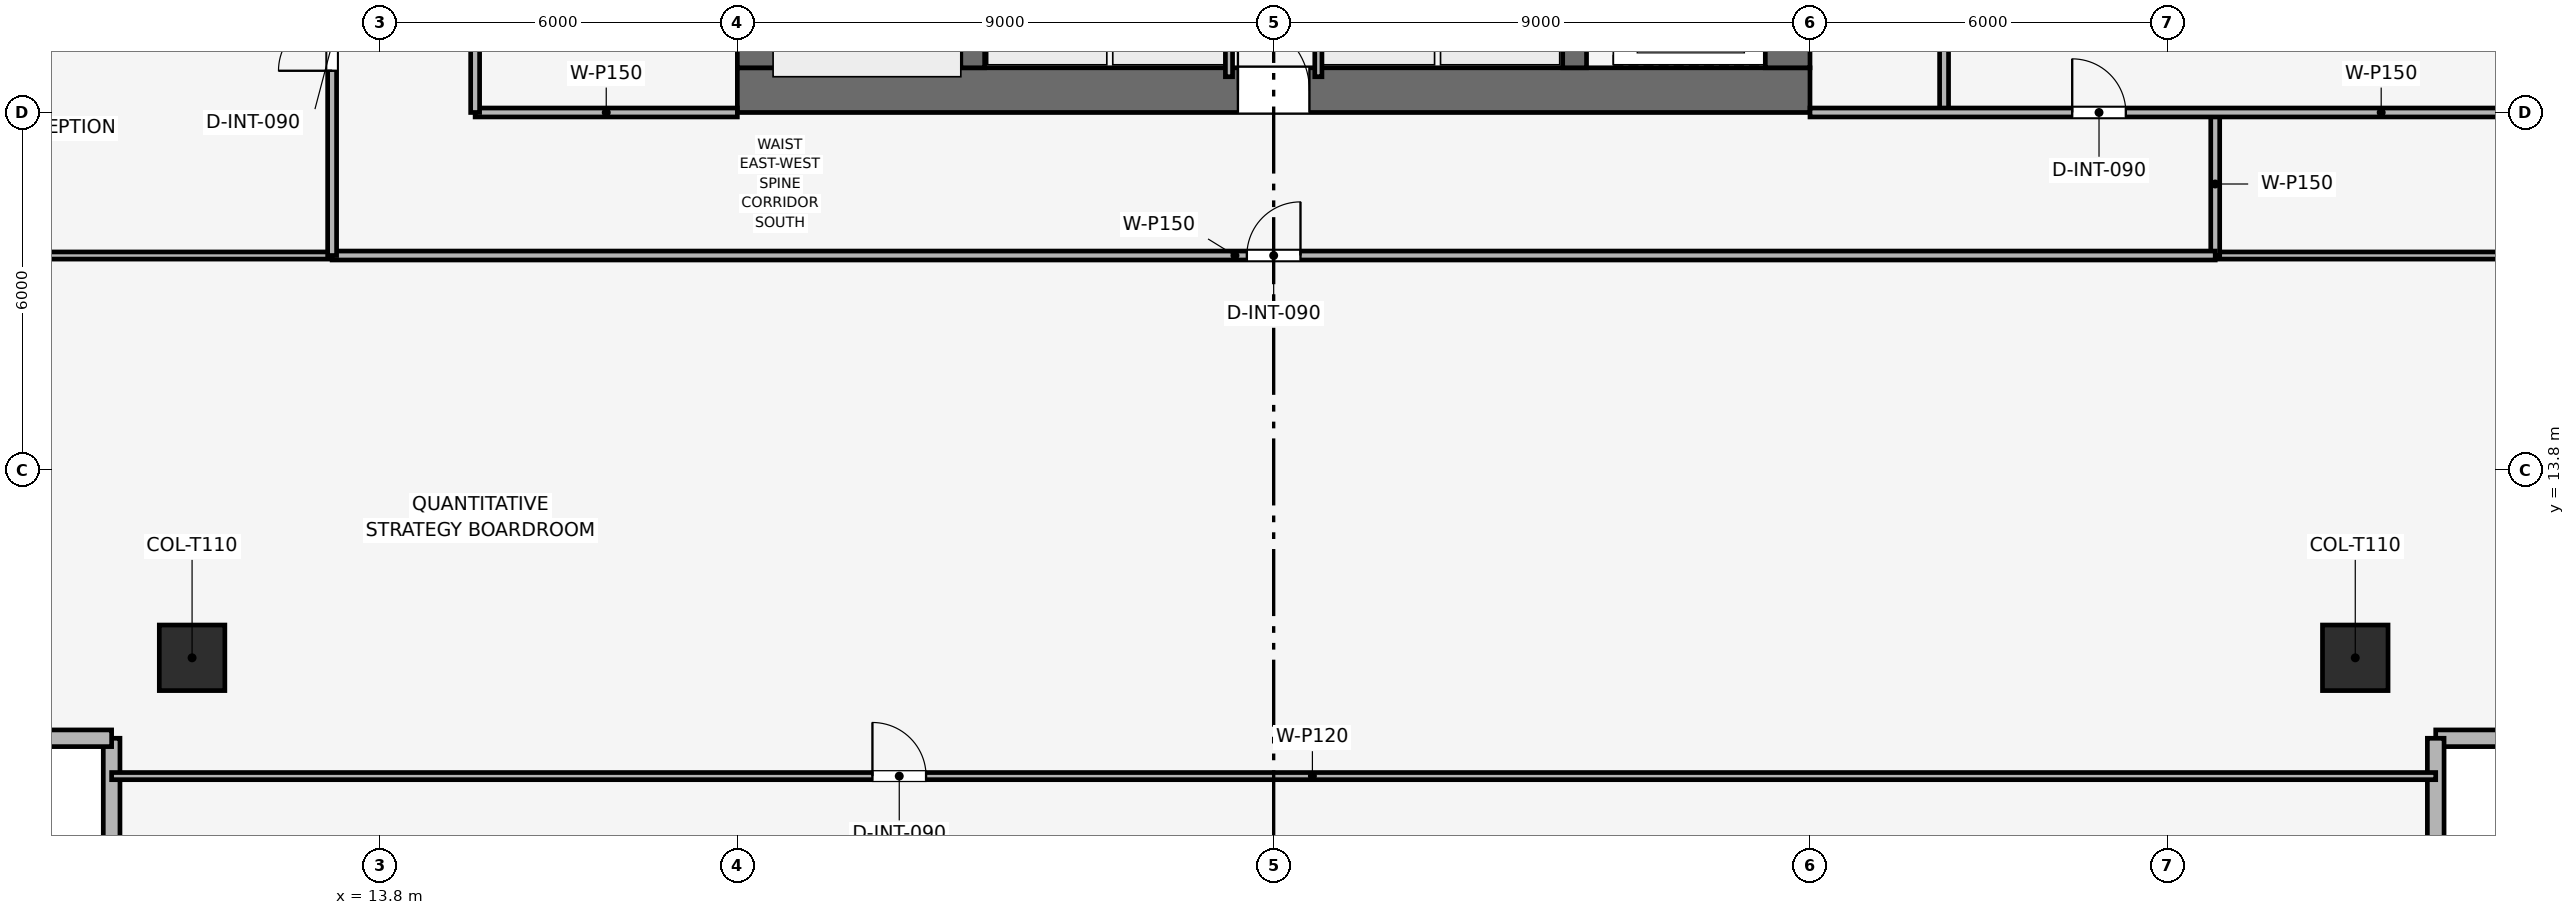
"""IFC4 building model, lengths in metres.
Left out: names, types, materials, properties, quantities, classifications, styles, units other than length and angle.
Written with IfcOpenShell. Run it as: python <this file> out.ifc"""

import sys

from ifc_helpers import new_model, si_unit, direction, frame, frame_2d, origin, origin_2d, place, context, subcontext, project, spatial, rectangle, extrude, element, fill, save


model = new_model("IFC4")
c1 = context("Model", 3, precision=1e-05, world=origin(), true_north=direction((0.0, 1.0)))
c2 = subcontext(c1, "Body", "Model", "MODEL_VIEW")
j1 = project(units=[si_unit("LENGTHUNIT", "METRE"), si_unit("PLANEANGLEUNIT", "RADIAN")], contexts=[c1])
p1 = place(None, origin())
s1 = spatial("IfcSite", under=j1, at=p1, CompositionType="ELEMENT")
p2 = place(p1, origin())
s2 = spatial("IfcBuilding", under=s1, at=p2, CompositionType="ELEMENT")
p3 = place(p2, frame((0.0, 0.0, 222.45)))
s3 = spatial("IfcBuildingStorey", under=s2, at=p3, CompositionType="ELEMENT", Elevation=222.45)
p4 = place(p3, frame((19.8, 20.175, 0.0), z_axis=(0.0, 0.0, 1.0), x_axis=(1.0, 0.0, 0.0)))
e1 = element("IfcWall", 1, at=p4, inside=s3, PredefinedType="SHEAR", context=c2, shape_type="SweptSolid", body=[
    extrude(rectangle(XDim=18.0, YDim=0.75, at=frame_2d((9.0, 0.0))), origin(), (0.0, 0.0, 1.0), 3.75),
])
p5 = place(p4, frame((8.4, 0.0, 0.0)))
e2 = element("IfcOpeningElement", 2, at=p5, cuts=e1, PredefinedType="OPENING", context=c2, shape_type="SweptSolid", body=[
    extrude(rectangle(XDim=1.2, YDim=2.2, at=frame_2d((0.6, 1.1))), frame((0.0, 0.385, 0.0), z_axis=(0.0, -1.0, 0.0), x_axis=(1.0, 0.0, 0.0)), (0.0, 0.0, 1.0), 0.77),
])
p6 = place(p3, frame((20.175, 20.55, 0.0), z_axis=(0.0, 0.0, 1.0), x_axis=(0.0, 1.0, 0.0)))
e3 = element("IfcWall", 3, at=p6, inside=s3, PredefinedType="SHEAR", context=c2, shape_type="SweptSolid", body=[
    extrude(rectangle(XDim=16.5, YDim=0.75, at=frame_2d((8.25, 0.0))), origin(), (0.0, 0.0, 1.0), 3.75),
])
p7 = place(p6, frame((10.25, 0.0, 0.0)))
e4 = element("IfcOpeningElement", 4, at=p7, cuts=e3, PredefinedType="OPENING", context=c2, shape_type="SweptSolid", body=[
    extrude(rectangle(XDim=1.1, YDim=2.15, at=frame_2d((0.55, 1.075))), frame((0.0, 0.385, 0.0), z_axis=(0.0, -1.0, 0.0), x_axis=(1.0, 0.0, 0.0)), (0.0, 0.0, 1.0), 0.77),
])
p8 = place(p3, frame((37.425, 20.55, 0.0), z_axis=(0.0, 0.0, 1.0), x_axis=(0.0, 1.0, 0.0)))
e5 = element("IfcWall", 5, at=p8, inside=s3, PredefinedType="SHEAR", context=c2, shape_type="SweptSolid", body=[
    extrude(rectangle(XDim=16.5, YDim=0.75, at=frame_2d((8.25, 0.0))), origin(), (0.0, 0.0, 1.0), 3.75),
])
p9 = place(p8, frame((4.75, 0.0, 0.0)))
e6 = element("IfcOpeningElement", 6, at=p9, cuts=e5, PredefinedType="OPENING", context=c2, shape_type="SweptSolid", body=[
    extrude(rectangle(XDim=1.1, YDim=2.15, at=frame_2d((0.55, 1.075))), frame((0.0, 0.385, 0.0), z_axis=(0.0, -1.0, 0.0), x_axis=(1.0, 0.0, 0.0)), (0.0, 0.0, 1.0), 0.77),
])
for number, where, z_axis, x_axis in (
    (7, (23.75, 20.55, 0.0), (0.0, 0.0, 1.0), (0.0, 1.0, 0.0)),
    (8, (33.85, 20.55, 0.0), (0.0, 0.0, 1.0), (0.0, 1.0, 0.0)),
):
    element("IfcWall", number, at=place(p3, frame(where, z_axis=z_axis, x_axis=x_axis)), inside=s3, PredefinedType="SHEAR", context=c2, shape_type="SweptSolid", body=[
        extrude(rectangle(XDim=16.5, YDim=0.4, at=frame_2d((8.25, 0.0))), origin(), (0.0, 0.0, 1.0), 3.75),
    ])
for number, where, z_axis, x_axis in (
    (9, (10.65, 10.65, 0.003), (0.0, 0.0, 1.0), (1.0, 0.0, 0.0)),
    (10, (46.95, 10.65, 0.003), (0.0, 0.0, 1.0), (1.0, 0.0, 0.0)),
):
    element("IfcColumn", number, at=place(p3, frame(where, z_axis=z_axis, x_axis=x_axis)), inside=s3, PredefinedType="COLUMN", context=c2, shape_type="SweptSolid", body=[
        extrude(rectangle(XDim=1.1, YDim=1.1, at=origin_2d()), origin(), (0.0, 0.0, 1.0), 3.494),
    ])
p10 = place(p3, frame((9.3, 1.93, 0.0), z_axis=(0.0, 0.0, 1.0), x_axis=(0.0, 1.0, 0.0)))
e11 = element("IfcWall", 11, at=p10, inside=s3, PredefinedType="SOLIDWALL", context=c2, shape_type="SweptSolid", body=[
    extrude(rectangle(XDim=7.37, YDim=0.28, at=frame_2d((3.685, 0.0))), origin(), (0.0, 0.0, 1.0), 3.5),
])
p11 = place(p10, frame((2.435, 0.0, 0.9)))
e12 = element("IfcOpeningElement", 12, at=p11, cuts=e11, PredefinedType="OPENING", context=c2, shape_type="SweptSolid", body=[
    extrude(rectangle(XDim=2.5, YDim=1.9, at=frame_2d((1.25, 0.95))), frame((0.0, 0.15, 0.0), z_axis=(0.0, -1.0, 0.0), x_axis=(1.0, 0.0, 0.0)), (0.0, 0.0, 1.0), 0.3),
])
p12 = place(p3, frame((9.3, 9.3, 0.0), z_axis=(0.0, 0.0, 1.0), x_axis=(-1.0, 0.0, 0.0)))
e13 = element("IfcWall", 13, at=p12, inside=s3, PredefinedType="SOLIDWALL", context=c2, shape_type="SweptSolid", body=[
    extrude(rectangle(XDim=7.37, YDim=0.28, at=frame_2d((3.685, 0.0))), origin(), (0.0, 0.0, 1.0), 3.5),
])
p13 = place(p12, frame((2.435, 0.0, 0.9)))
e14 = element("IfcOpeningElement", 14, at=p13, cuts=e13, PredefinedType="OPENING", context=c2, shape_type="SweptSolid", body=[
    extrude(rectangle(XDim=2.5, YDim=1.9, at=frame_2d((1.25, 0.95))), frame((0.0, 0.15, 0.0), z_axis=(0.0, -1.0, 0.0), x_axis=(1.0, 0.0, 0.0)), (0.0, 0.0, 1.0), 0.3),
])
p14 = place(p3, frame((55.67, 9.3, 0.0), z_axis=(0.0, 0.0, 1.0), x_axis=(-1.0, 0.0, 0.0)))
e15 = element("IfcWall", 15, at=p14, inside=s3, PredefinedType="SOLIDWALL", context=c2, shape_type="SweptSolid", body=[
    extrude(rectangle(XDim=7.37, YDim=0.28, at=frame_2d((3.685, 0.0))), origin(), (0.0, 0.0, 1.0), 3.5),
])
p15 = place(p14, frame((2.435, 0.0, 0.9)))
e16 = element("IfcOpeningElement", 16, at=p15, cuts=e15, PredefinedType="OPENING", context=c2, shape_type="SweptSolid", body=[
    extrude(rectangle(XDim=2.5, YDim=1.9, at=frame_2d((1.25, 0.95))), frame((0.0, 0.15, 0.0), z_axis=(0.0, -1.0, 0.0), x_axis=(1.0, 0.0, 0.0)), (0.0, 0.0, 1.0), 0.3),
])
p16 = place(p3, frame((48.3, 9.3, 0.0), z_axis=(0.0, 0.0, 1.0), x_axis=(0.0, -1.0, 0.0)))
e17 = element("IfcWall", 17, at=p16, inside=s3, PredefinedType="SOLIDWALL", context=c2, shape_type="SweptSolid", body=[
    extrude(rectangle(XDim=7.37, YDim=0.28, at=frame_2d((3.685, 0.0))), origin(), (0.0, 0.0, 1.0), 3.5),
])
p17 = place(p16, frame((2.435, 0.0, 0.9)))
e18 = element("IfcOpeningElement", 18, at=p17, cuts=e17, PredefinedType="OPENING", context=c2, shape_type="SweptSolid", body=[
    extrude(rectangle(XDim=2.5, YDim=1.9, at=frame_2d((1.25, 0.95))), frame((0.0, 0.15, 0.0), z_axis=(0.0, -1.0, 0.0), x_axis=(1.0, 0.0, 0.0)), (0.0, 0.0, 1.0), 0.3),
])
for number, where, z_axis, x_axis in (
    (19, (28.05, 20.4, 0.0), (0.0, 0.0, 1.0), (0.0, 1.0, 0.0)),
    (20, (29.55, 20.4, 0.0), (0.0, 0.0, 1.0), (0.0, 1.0, 0.0)),
):
    element("IfcWall", number, at=place(p3, frame(where, z_axis=z_axis, x_axis=x_axis)), inside=s3, PredefinedType="PARTITIONING", context=c2, shape_type="SweptSolid", body=[
        extrude(rectangle(XDim=2.75, YDim=0.12, at=frame_2d((1.375, 0.0))), origin(), (0.0, 0.0, 1.0), 3.5),
    ])
p18 = place(p3, frame((15.4, 19.8, 0.0), z_axis=(0.0, 0.0, 1.0), x_axis=(1.0, 0.0, 0.0)))
e21 = element("IfcWall", 21, at=p18, inside=s3, PredefinedType="PARTITIONING", context=c2, shape_type="SweptSolid", body=[
    extrude(rectangle(XDim=4.4, YDim=0.15, at=frame_2d((2.2, 0.0))), origin(), (0.0, 0.0, 1.0), 3.035),
])
p19 = place(p3, frame((15.4, 19.8, 0.0), z_axis=(0.0, 0.0, 1.0), x_axis=(0.0, 1.0, 0.0)))
e22 = element("IfcWall", 22, at=p19, inside=s3, PredefinedType="PARTITIONING", context=c2, shape_type="SweptSolid", body=[
    extrude(rectangle(XDim=10.35, YDim=0.15, at=frame_2d((5.175, 0.0))), origin(), (0.0, 0.0, 1.0), 3.035),
])
p20 = place(p19, frame((1.2, 0.0, 0.0)))
e23 = element("IfcOpeningElement", 23, at=p20, cuts=e22, PredefinedType="OPENING", context=c2, shape_type="SweptSolid", body=[
    extrude(rectangle(XDim=0.9, YDim=2.1, at=frame_2d((0.45, 1.05))), frame((0.0, 0.085, 0.0), z_axis=(0.0, -1.0, 0.0), x_axis=(1.0, 0.0, 0.0)), (0.0, 0.0, 1.0), 0.17),
])
p21 = place(p19, frame((4.7, 0.0, 0.0)))
e24 = element("IfcOpeningElement", 24, at=p21, cuts=e22, PredefinedType="OPENING", context=c2, shape_type="SweptSolid", body=[
    extrude(rectangle(XDim=0.9, YDim=2.1, at=frame_2d((0.45, 1.05))), frame((0.0, 0.085, 0.0), z_axis=(0.0, -1.0, 0.0), x_axis=(1.0, 0.0, 0.0)), (0.0, 0.0, 1.0), 0.17),
])
p22 = place(p19, frame((8.1, 0.0, 0.0)))
e25 = element("IfcOpeningElement", 25, at=p22, cuts=e22, PredefinedType="OPENING", context=c2, shape_type="SweptSolid", body=[
    extrude(rectangle(XDim=0.95, YDim=2.1, at=frame_2d((0.475, 1.05))), frame((0.0, 0.085, 0.0), z_axis=(0.0, -1.0, 0.0), x_axis=(1.0, 0.0, 0.0)), (0.0, 0.0, 1.0), 0.17),
])
p23 = place(p3, frame((40.05, 19.8, 0.0), z_axis=(0.0, 0.0, 1.0), x_axis=(0.0, 1.0, 0.0)))
e26 = element("IfcWall", 26, at=p23, inside=s3, PredefinedType="PARTITIONING", context=c2, shape_type="SweptSolid", body=[
    extrude(rectangle(XDim=7.05, YDim=0.15, at=frame_2d((3.525, 0.0))), origin(), (0.0, 0.0, 1.0), 3.035),
])
p24 = place(p3, frame((9.3, 8.665, 0.0), z_axis=(0.0, 0.0, 1.0), x_axis=(1.0, 0.0, 0.0)))
e27 = element("IfcWall", 27, at=p24, inside=s3, PredefinedType="PARTITIONING", context=c2, shape_type="SweptSolid", body=[
    extrude(rectangle(XDim=39.0, YDim=0.12, at=frame_2d((19.5, 0.0))), origin(), (0.0, 0.0, 1.0), 2.885),
])
p25 = place(p24, frame((12.767, 0.0, 0.0)))
e28 = element("IfcOpeningElement", 28, at=p25, cuts=e27, PredefinedType="OPENING", context=c2, shape_type="SweptSolid", body=[
    extrude(rectangle(XDim=0.9, YDim=2.1, at=frame_2d((0.45, 1.05))), frame((0.0, 0.07, 0.0), z_axis=(0.0, -1.0, 0.0), x_axis=(1.0, 0.0, 0.0)), (0.0, 0.0, 1.0), 0.14),
])
p26 = place(p3, frame((1.93, 17.4, 0.0), z_axis=(0.0, 0.0, 1.0), x_axis=(1.0, 0.0, 0.0)))
e29 = element("IfcWall", 29, at=p26, inside=s3, PredefinedType="PARTITIONING", context=c2, shape_type="SweptSolid", body=[
    extrude(rectangle(XDim=11.07, YDim=0.12, at=frame_2d((5.535, 0.0))), origin(), (0.0, 0.0, 1.0), 2.885),
])
p27 = place(p3, frame((44.6, 17.4, 0.0), z_axis=(0.0, 0.0, 1.0), x_axis=(1.0, 0.0, 0.0)))
e30 = element("IfcWall", 30, at=p27, inside=s3, PredefinedType="PARTITIONING", context=c2, shape_type="SweptSolid", body=[
    extrude(rectangle(XDim=11.07, YDim=0.12, at=frame_2d((5.535, 0.0))), origin(), (0.0, 0.0, 1.0), 2.885),
])
p28 = place(p3, frame((44.6, 17.4, 0.0), z_axis=(0.0, 0.0, 1.0), x_axis=(0.0, 1.0, 0.0)))
e31 = element("IfcWall", 31, at=p28, inside=s3, PredefinedType="PARTITIONING", context=c2, shape_type="SweptSolid", body=[
    extrude(rectangle(XDim=2.4, YDim=0.15, at=frame_2d((1.2, 0.0))), origin(), (0.0, 0.0, 1.0), 3.5),
])
p29 = place(p3, frame((37.8, 19.8, 0.0), z_axis=(0.0, 0.0, 1.0), x_axis=(1.0, 0.0, 0.0)))
e32 = element("IfcWall", 32, at=p29, inside=s3, PredefinedType="PARTITIONING", context=c2, shape_type="SweptSolid", body=[
    extrude(rectangle(XDim=17.87, YDim=0.15, at=frame_2d((8.935, 0.0))), origin(), (0.0, 0.0, 1.0), 2.885),
])
p30 = place(p29, frame((4.4, 0.0, 0.0)))
e33 = element("IfcOpeningElement", 33, at=p30, cuts=e32, PredefinedType="OPENING", context=c2, shape_type="SweptSolid", body=[
    extrude(rectangle(XDim=0.9, YDim=2.1, at=frame_2d((0.45, 1.05))), frame((0.0, 0.085, 0.0), z_axis=(0.0, -1.0, 0.0), x_axis=(1.0, 0.0, 0.0)), (0.0, 0.0, 1.0), 0.17),
])
p31 = place(p3, frame((13.0, 17.4, 0.0), z_axis=(0.0, 0.0, 1.0), x_axis=(1.0, 0.0, 0.0)))
e34 = element("IfcWall", 34, at=p31, inside=s3, PredefinedType="PARTITIONING", context=c2, shape_type="SweptSolid", body=[
    extrude(rectangle(XDim=31.6, YDim=0.15, at=frame_2d((15.8, 0.0))), origin(), (0.0, 0.0, 1.0), 3.035),
])
p32 = place(p31, frame((15.35, 0.0, 0.0)))
e35 = element("IfcOpeningElement", 35, at=p32, cuts=e34, PredefinedType="OPENING", context=c2, shape_type="SweptSolid", body=[
    extrude(rectangle(XDim=0.9, YDim=2.1, at=frame_2d((0.45, 1.05))), frame((0.0, 0.085, 0.0), z_axis=(0.0, -1.0, 0.0), x_axis=(1.0, 0.0, 0.0)), (0.0, 0.0, 1.0), 0.17),
])
p33 = place(p3, frame((13.0, 17.4, 0.0), z_axis=(0.0, 0.0, 1.0), x_axis=(0.0, 1.0, 0.0)))
e36 = element("IfcWall", 36, at=p33, inside=s3, PredefinedType="PARTITIONING", context=c2, shape_type="SweptSolid", body=[
    extrude(rectangle(XDim=22.8, YDim=0.15, at=frame_2d((11.4, 0.0))), origin(), (0.0, 0.0, 1.0), 3.035),
])
p34 = place(p33, frame((3.1, 0.0, 0.0)))
e37 = element("IfcOpeningElement", 37, at=p34, cuts=e36, PredefinedType="OPENING", context=c2, shape_type="SweptSolid", body=[
    extrude(rectangle(XDim=0.9, YDim=2.1, at=frame_2d((0.45, 1.05))), frame((0.0, 0.085, 0.0), z_axis=(0.0, -1.0, 0.0), x_axis=(1.0, 0.0, 0.0)), (0.0, 0.0, 1.0), 0.17),
])
p35 = place(p33, frame((7.685, 0.0, 0.0)))
e38 = element("IfcOpeningElement", 38, at=p35, cuts=e36, PredefinedType="OPENING", context=c2, shape_type="SweptSolid", body=[
    extrude(rectangle(XDim=0.9, YDim=2.1, at=frame_2d((0.45, 1.05))), frame((0.0, 0.085, 0.0), z_axis=(0.0, -1.0, 0.0), x_axis=(1.0, 0.0, 0.0)), (0.0, 0.0, 1.0), 0.17),
])
p36 = place(p33, frame((15.535, 0.0, 0.0)))
e39 = element("IfcOpeningElement", 39, at=p36, cuts=e36, PredefinedType="OPENING", context=c2, shape_type="SweptSolid", body=[
    extrude(rectangle(XDim=0.9, YDim=2.1, at=frame_2d((0.45, 1.05))), frame((0.0, 0.085, 0.0), z_axis=(0.0, -1.0, 0.0), x_axis=(1.0, 0.0, 0.0)), (0.0, 0.0, 1.0), 0.17),
])
p37 = place(p25, origin())
e40 = element("IfcDoor", 40, at=p37, inside=s3, OperationType="SINGLE_SWING_LEFT", PredefinedType="DOOR", context=c2, shape_type="SweptSolid", body=[
    extrude(rectangle(XDim=0.9, YDim=2.1, at=frame_2d((0.45, 1.05))), frame((0.0, 0.025, 0.0), z_axis=(0.0, -1.0, 0.0), x_axis=(1.0, 0.0, 0.0)), (0.0, 0.0, 1.0), 0.05),
])
fill(e28, e40)
p38 = place(p30, origin())
e41 = element("IfcDoor", 41, at=p38, inside=s3, OperationType="SINGLE_SWING_LEFT", PredefinedType="DOOR", context=c2, shape_type="SweptSolid", body=[
    extrude(rectangle(XDim=0.9, YDim=2.1, at=frame_2d((0.45, 1.05))), frame((0.0, 0.025, 0.0), z_axis=(0.0, -1.0, 0.0), x_axis=(1.0, 0.0, 0.0)), (0.0, 0.0, 1.0), 0.05),
])
fill(e33, e41)
p39 = place(p32, origin())
e42 = element("IfcDoor", 42, at=p39, inside=s3, OperationType="SINGLE_SWING_RIGHT", PredefinedType="DOOR", context=c2, shape_type="SweptSolid", body=[
    extrude(rectangle(XDim=0.9, YDim=2.1, at=frame_2d((0.45, 1.05))), frame((0.0, 0.025, 0.0), z_axis=(0.0, -1.0, 0.0), x_axis=(1.0, 0.0, 0.0)), (0.0, 0.0, 1.0), 0.05),
])
fill(e35, e42)
p40 = place(p34, origin())
e43 = element("IfcDoor", 43, at=p40, inside=s3, OperationType="SINGLE_SWING_LEFT", PredefinedType="DOOR", context=c2, shape_type="SweptSolid", body=[
    extrude(rectangle(XDim=0.9, YDim=2.1, at=frame_2d((0.45, 1.05))), frame((0.0, 0.025, 0.0), z_axis=(0.0, -1.0, 0.0), x_axis=(1.0, 0.0, 0.0)), (0.0, 0.0, 1.0), 0.05),
])
fill(e37, e43)
p41 = place(p5, origin())
e44 = element("IfcDoor", 44, at=p41, inside=s3, OperationType="SINGLE_SWING_LEFT", PredefinedType="DOOR", context=c2, shape_type="SweptSolid", body=[
    extrude(rectangle(XDim=1.2, YDim=2.2, at=frame_2d((0.6, 1.1))), frame((0.0, 0.025, 0.0), z_axis=(0.0, -1.0, 0.0), x_axis=(1.0, 0.0, 0.0)), (0.0, 0.0, 1.0), 0.05),
])
fill(e2, e44)
save(model, sys.argv[1])
